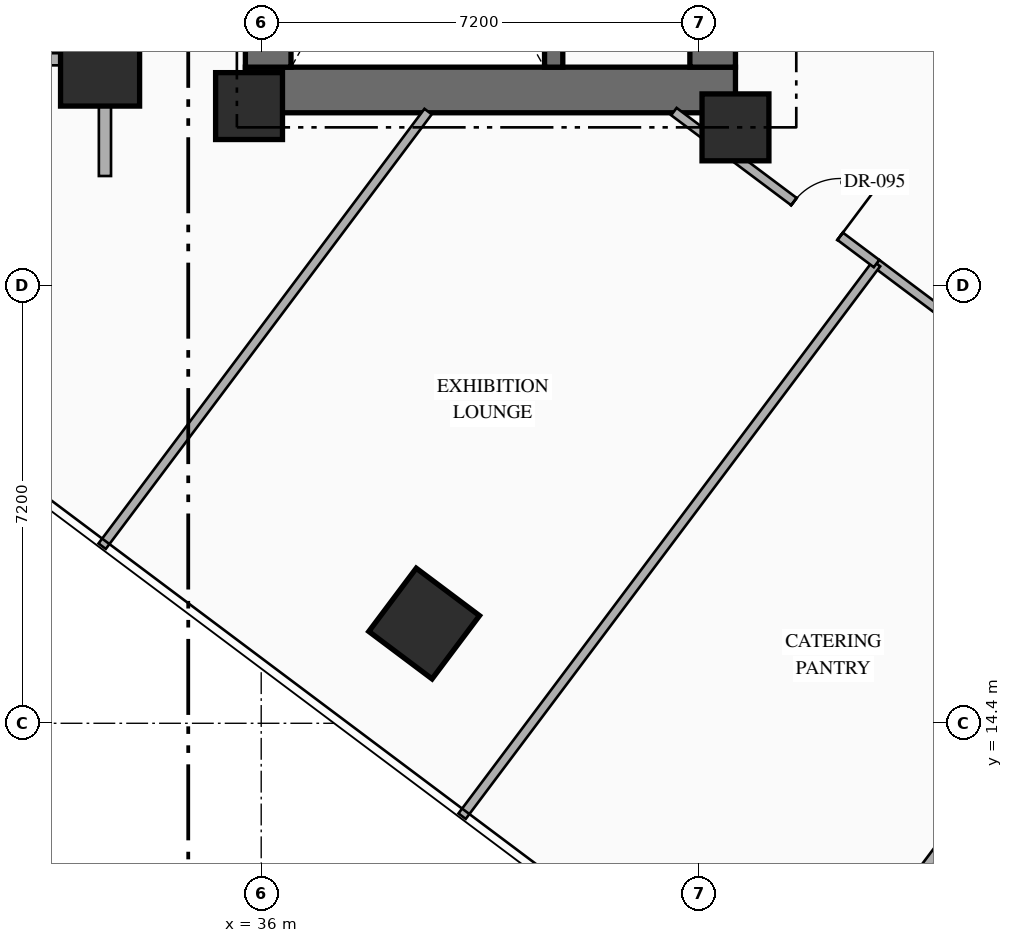
"""IFC4 building model, lengths in metres.
Left out: names, types, materials, properties, quantities, classifications, styles, units other than length and angle.
Written with IfcOpenShell. Run it as: python <this file> out.ifc"""

import sys

from ifc_helpers import new_model, si_unit, direction, frame, frame_2d, origin, origin_2d, place, context, subcontext, project, spatial, rectangle, extrude, element, fill, save


model = new_model("IFC4")
c1 = context("Model", 3, precision=1e-05, world=origin(), true_north=direction((0.0, 1.0)))
c2 = subcontext(c1, "Body", "Model", "MODEL_VIEW")
j1 = project(units=[si_unit("LENGTHUNIT", "METRE"), si_unit("PLANEANGLEUNIT", "RADIAN")], contexts=[c1])
p1 = place(None, origin())
s1 = spatial("IfcSite", under=j1, at=p1, CompositionType="ELEMENT")
p2 = place(p1, origin())
s2 = spatial("IfcBuilding", under=s1, at=p2, CompositionType="ELEMENT")
p3 = place(p2, frame((0.0, 0.0, 21.6)))
s3 = spatial("IfcBuildingStorey", under=s2, at=p3, CompositionType="ELEMENT", Elevation=21.6)
p4 = place(p3, frame((35.74, 24.815, 0.0), z_axis=(0.0, 0.0, 1.0), x_axis=(1.0, 0.0, 0.0)))
e1 = element("IfcWall", 1, at=p4, inside=s3, PredefinedType="SHEAR", context=c2, shape_type="SweptSolid", body=[
    extrude(rectangle(XDim=8.06, YDim=0.75, at=frame_2d((4.03, 0.0))), origin(), (0.0, 0.0, 1.0), 5.4),
])
p5 = place(p3, frame((36.115, 25.19, 0.0), z_axis=(0.0, 0.0, 1.0), x_axis=(0.0, 1.0, 0.0)))
e2 = element("IfcWall", 2, at=p5, inside=s3, PredefinedType="SHEAR", context=c2, shape_type="SweptSolid", body=[
    extrude(rectangle(XDim=9.48, YDim=0.75, at=frame_2d((4.74, 0.0))), origin(), (0.0, 0.0, 1.0), 5.4),
])
p6 = place(p3, frame((43.425, 25.19, 0.0), z_axis=(0.0, 0.0, 1.0), x_axis=(0.0, 1.0, 0.0)))
e3 = element("IfcWall", 3, at=p6, inside=s3, PredefinedType="SHEAR", context=c2, shape_type="SweptSolid", body=[
    extrude(rectangle(XDim=9.48, YDim=0.75, at=frame_2d((4.74, 0.0))), origin(), (0.0, 0.0, 1.0), 5.4),
])
p7 = place(p6, frame((1.21, 0.0, 0.0)))
e4 = element("IfcOpeningElement", 4, at=p7, cuts=e3, PredefinedType="OPENING", context=c2, shape_type="SweptSolid", body=[
    extrude(rectangle(XDim=0.85, YDim=2.08, at=frame_2d((0.425, 1.04))), frame((0.0, 0.385, 0.0), z_axis=(0.0, -1.0, 0.0), x_axis=(1.0, 0.0, 0.0)), (0.0, 0.0, 1.0), 0.77),
])
p8 = place(p6, frame((4.46, 0.0, 0.0)))
e5 = element("IfcOpeningElement", 5, at=p8, cuts=e3, PredefinedType="OPENING", context=c2, shape_type="SweptSolid", body=[
    extrude(rectangle(XDim=0.85, YDim=2.08, at=frame_2d((0.425, 1.04))), frame((0.0, 0.385, 0.0), z_axis=(0.0, -1.0, 0.0), x_axis=(1.0, 0.0, 0.0)), (0.0, 0.0, 1.0), 0.77),
])
p9 = place(p3, frame((40.81, 25.19, 0.0), z_axis=(0.0, 0.0, 1.0), x_axis=(0.0, 1.0, 0.0)))
e6 = element("IfcWall", 6, at=p9, inside=s3, PredefinedType="SHEAR", context=c2, shape_type="SweptSolid", body=[
    extrude(rectangle(XDim=9.48, YDim=0.3, at=frame_2d((4.74, 0.0))), origin(), (0.0, 0.0, 1.0), 5.4),
])
for number, where, z_axis, x_axis in (
    (7, (35.8, 24.55, 0.0), (0.0, 0.0, 1.0), (1.0, 0.0, 0.0)),
    (8, (43.8, 24.2, 0.0), (0.0, 0.0, 1.0), (1.0, 0.0, 0.0)),
):
    element("IfcColumn", number, at=place(p3, frame(where, z_axis=z_axis, x_axis=x_axis)), inside=s3, PredefinedType="COLUMN", context=c2, shape_type="SweptSolid", body=[
        extrude(rectangle(XDim=1.1, YDim=1.1, at=origin_2d()), origin(), (0.0, 0.0, 1.0), 5.4),
    ])
for number, where, z_axis, x_axis in (
    (9, (33.35, 25.2, 0.0), (0.0, 0.0, 1.0), (1.0, 0.0, 0.0)),
    (10, (38.68, 16.04, 0.0), (0.0, 0.0, 1.0), (0.8, -0.6, 0.0)),
):
    element("IfcColumn", number, at=place(p3, frame(where, z_axis=z_axis, x_axis=x_axis)), inside=s3, PredefinedType="COLUMN", context=c2, shape_type="SweptSolid", body=[
        extrude(rectangle(XDim=1.3, YDim=1.3, at=origin_2d()), origin(), (0.0, 0.0, 1.0), 5.4),
    ])
p10 = place(p3, frame((33.43, 23.4, 0.0), z_axis=(0.0, 0.0, 1.0), x_axis=(0.0, 1.0, 0.0)))
e11 = element("IfcWall", 11, at=p10, inside=s3, PredefinedType="STANDARD", context=c2, shape_type="SweptSolid", body=[
    extrude(rectangle(XDim=4.08, YDim=0.2, at=frame_2d((2.04, 0.0))), origin(), (0.0, 0.0, 1.0), 3.895),
])
p11 = place(p3, frame((25.55, 25.32, 0.0), z_axis=(0.0, 0.0, 1.0), x_axis=(1.0, 0.0, 0.0)))
e12 = element("IfcWall", 12, at=p11, inside=s3, PredefinedType="STANDARD", context=c2, shape_type="SweptSolid", body=[
    extrude(rectangle(XDim=7.88, YDim=0.2, at=frame_2d((3.94, 0.0))), origin(), (0.0, 0.0, 1.0), 4.495),
])
p12 = place(p3, frame((46.12, 21.96, 0.0), z_axis=(0.0, 0.0, 1.0), x_axis=(0.799991121809, -0.600011837406, 0.0)))
e13 = element("IfcWall", 13, at=p12, inside=s3, PredefinedType="PARTITIONING", context=c2, shape_type="SweptSolid", body=[
    extrude(rectangle(XDim=6.6, YDim=0.15, at=frame_2d((3.3, 0.0))), origin(), (0.0, 0.0, 1.0), 3.295),
])
p13 = place(p12, frame((2.8, 0.0, 0.0)))
e14 = element("IfcOpeningElement", 14, at=p13, cuts=e13, PredefinedType="OPENING", context=c2, shape_type="SweptSolid", body=[
    extrude(rectangle(XDim=1.0, YDim=2.15, at=frame_2d((0.5, 1.075))), frame((0.0, 0.085, 0.0), z_axis=(0.0, -1.0, 0.0), x_axis=(1.0, 0.0, 0.0)), (0.0, 0.0, 1.0), 0.17),
])
p14 = place(p3, frame((39.304, 12.872, 0.0), z_axis=(0.0, 0.0, 1.0), x_axis=(0.600013754301, 0.79998968409, 0.0)))
e15 = element("IfcWall", 15, at=p14, inside=s3, PredefinedType="PARTITIONING", context=c2, shape_type="SweptSolid", body=[
    extrude(rectangle(XDim=11.36, YDim=0.15, at=frame_2d((5.68, 0.0))), origin(), (0.0, 0.0, 1.0), 5.1),
])
p15 = place(p3, frame((44.584, 8.912, 0.0), z_axis=(0.0, 0.0, 1.0), x_axis=(0.6, 0.8, 0.0)))
e16 = element("IfcWall", 16, at=p15, inside=s3, PredefinedType="PARTITIONING", context=c2, shape_type="SweptSolid", body=[
    extrude(rectangle(XDim=11.36, YDim=0.15, at=frame_2d((5.68, 0.0))), origin(), (0.0, 0.0, 1.0), 3.295),
])
p16 = place(p3, frame((42.787, 24.46, 0.0), z_axis=(0.0, 0.0, 1.0), x_axis=(0.799971872363, -0.600037501685, 0.0)))
e17 = element("IfcWall", 17, at=p16, inside=s3, PredefinedType="PARTITIONING", context=c2, shape_type="SweptSolid", body=[
    extrude(rectangle(XDim=4.167, YDim=0.15, at=frame_2d((2.083, 0.0))), origin(), (0.0, 0.0, 1.0), 3.295),
])
p17 = place(p16, frame((2.468, 0.0, 0.0)))
e18 = element("IfcOpeningElement", 18, at=p17, cuts=e17, PredefinedType="OPENING", context=c2, shape_type="SweptSolid", body=[
    extrude(rectangle(XDim=0.95, YDim=2.15, at=frame_2d((0.475, 1.075))), frame((0.0, 0.085, 0.0), z_axis=(0.0, -1.0, 0.0), x_axis=(1.0, 0.0, 0.0)), (0.0, 0.0, 1.0), 0.17),
])
p18 = place(p3, frame((33.384, 17.312, 0.0), z_axis=(0.0, 0.0, 1.0), x_axis=(0.600008743659, 0.799993442181, 0.0)))
e19 = element("IfcWall", 19, at=p18, inside=s3, PredefinedType="PARTITIONING", context=c2, shape_type="SweptSolid", body=[
    extrude(rectangle(XDim=8.935, YDim=0.15, at=frame_2d((4.468, 0.0))), origin(), (0.0, 0.0, 1.0), 5.1),
])
p19 = place(p17, origin())
e20 = element("IfcDoor", 20, at=p19, inside=s3, OperationType="SINGLE_SWING_RIGHT", PredefinedType="DOOR", context=c2, shape_type="SweptSolid", body=[
    extrude(rectangle(XDim=0.95, YDim=2.15, at=frame_2d((0.475, 1.075))), frame((0.0, 0.025, 0.0), z_axis=(0.0, -1.0, 0.0), x_axis=(1.0, 0.0, 0.0)), (0.0, 0.0, 1.0), 0.05),
])
fill(e18, e20)
save(model, sys.argv[1])
